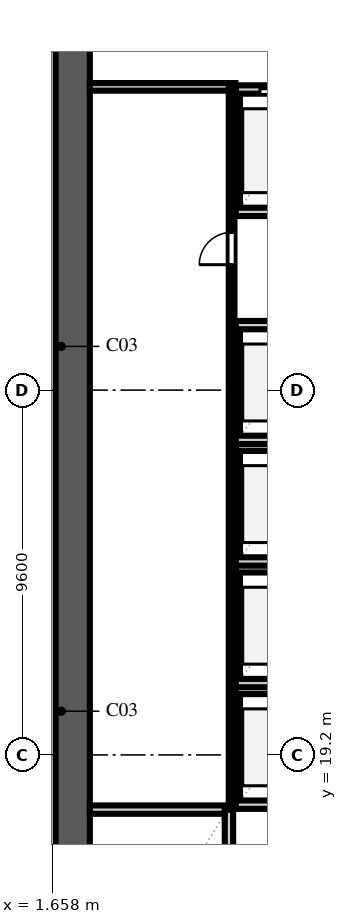
"""IFC4 building model, lengths in metres.
Left out: names, types, materials, properties, quantities, classifications, styles, units other than length and angle.
Written with IfcOpenShell. Run it as: python <this file> out.ifc"""

import sys

from ifc_helpers import new_model, si_unit, direction, frame, frame_2d, origin, place, context, subcontext, project, spatial, rectangle, extrude, element, fill, save


model = new_model("IFC4")
c1 = context("Model", 3, precision=1e-05, world=origin(), true_north=direction((0.0, 1.0)))
c2 = subcontext(c1, "Body", "Model", "MODEL_VIEW")
j1 = project(units=[si_unit("LENGTHUNIT", "METRE"), si_unit("PLANEANGLEUNIT", "RADIAN")], contexts=[c1])
p1 = place(None, origin())
s1 = spatial("IfcSite", under=j1, at=p1, CompositionType="ELEMENT")
p2 = place(p1, origin())
s2 = spatial("IfcBuilding", under=s1, at=p2, CompositionType="ELEMENT")
p3 = place(p2, frame((0.0, 0.0, 62.2)))
s3 = spatial("IfcBuildingStorey", under=s2, at=p3, CompositionType="ELEMENT", Elevation=62.2)
p4 = place(p3, frame((2.2, 9.15, 0.0), z_axis=(0.0, 0.0, 1.0), x_axis=(0.0, 1.0, 0.0)))
e1 = element("IfcWall", 1, at=p4, inside=s3, PredefinedType="SHEAR", context=c2, shape_type="SweptSolid", body=[
    extrude(rectangle(XDim=39.3, YDim=0.9, at=frame_2d((19.65, 0.0))), origin(), (0.0, 0.0, 1.0), 3.54),
])
p5 = place(p3, frame((6.31, 9.95, 0.0), z_axis=(0.0, 0.0, 1.0), x_axis=(0.0, 1.0, 0.0)))
e2 = element("IfcWall", 2, at=p5, inside=s3, PredefinedType="SOLIDWALL", context=c2, shape_type="SweptSolid", body=[
    extrude(rectangle(XDim=7.81, YDim=0.22, at=frame_2d((3.905, 0.0))), origin(), (0.0, 0.0, 1.0), 3.54),
])
p6 = place(p5, frame((0.14, 0.0, 0.0)))
e3 = element("IfcOpeningElement", 3, at=p6, cuts=e2, PredefinedType="OPENING", context=c2, shape_type="SweptSolid", body=[
    extrude(rectangle(XDim=1.1, YDim=2.2, at=frame_2d((0.55, 1.1))), frame((0.0, 0.122, 0.0), z_axis=(0.0, -1.0, 0.0), x_axis=(1.0, 0.0, 0.0)), (0.0, 0.0, 1.0), 0.244),
])
p7 = place(p3, frame((2.65, 17.76, 0.0), z_axis=(0.0, 0.0, 1.0), x_axis=(1.0, 0.0, 0.0)))
e4 = element("IfcWall", 4, at=p7, inside=s3, PredefinedType="SOLIDWALL", context=c2, shape_type="SweptSolid", body=[
    extrude(rectangle(XDim=3.55, YDim=0.22, at=frame_2d((1.775, 0.0))), origin(), (0.0, 0.0, 1.0), 3.54),
])
p8 = place(p3, frame((6.49, 18.11, 0.0), z_axis=(0.0, 0.0, 1.0), x_axis=(0.0, 1.0, 0.0)))
e5 = element("IfcWall", 5, at=p8, inside=s3, PredefinedType="SOLIDWALL", context=c2, shape_type="SweptSolid", body=[
    extrude(rectangle(XDim=2.58, YDim=0.22, at=frame_2d((1.29, 0.0))), origin(), (0.0, 0.0, 1.0), 3.54),
])
for number, where, z_axis, x_axis in (
    (6, (6.49, 17.89, 0.0), (0.0, 0.0, 1.0), (1.0, 0.0, 0.0)),
    (7, (6.49, 20.91, 0.0), (0.0, 0.0, 1.0), (1.0, 0.0, 0.0)),
):
    element("IfcWall", number, at=place(p3, frame(where, z_axis=z_axis, x_axis=x_axis)), inside=s3, PredefinedType="SOLIDWALL", context=c2, shape_type="SweptSolid", body=[
        extrude(rectangle(XDim=2.47, YDim=0.22, at=frame_2d((1.235, 0.0))), origin(), (0.0, 0.0, 1.0), 3.54),
    ])
p9 = place(p3, frame((6.49, 21.31, 0.0), z_axis=(0.0, 0.0, 1.0), x_axis=(0.0, 1.0, 0.0)))
e8 = element("IfcWall", 8, at=p9, inside=s3, PredefinedType="SOLIDWALL", context=c2, shape_type="SweptSolid", body=[
    extrude(rectangle(XDim=2.58, YDim=0.22, at=frame_2d((1.29, 0.0))), origin(), (0.0, 0.0, 1.0), 3.54),
])
for number, where, z_axis, x_axis in (
    (9, (6.49, 21.09, 0.0), (0.0, 0.0, 1.0), (1.0, 0.0, 0.0)),
    (10, (6.49, 24.11, 0.0), (0.0, 0.0, 1.0), (1.0, 0.0, 0.0)),
):
    element("IfcWall", number, at=place(p3, frame(where, z_axis=z_axis, x_axis=x_axis)), inside=s3, PredefinedType="SOLIDWALL", context=c2, shape_type="SweptSolid", body=[
        extrude(rectangle(XDim=2.47, YDim=0.22, at=frame_2d((1.235, 0.0))), origin(), (0.0, 0.0, 1.0), 3.54),
    ])
p10 = place(p3, frame((6.49, 24.51, 0.0), z_axis=(0.0, 0.0, 1.0), x_axis=(0.0, 1.0, 0.0)))
e11 = element("IfcWall", 11, at=p10, inside=s3, PredefinedType="SOLIDWALL", context=c2, shape_type="SweptSolid", body=[
    extrude(rectangle(XDim=2.58, YDim=0.22, at=frame_2d((1.29, 0.0))), origin(), (0.0, 0.0, 1.0), 3.54),
])
for number, where, z_axis, x_axis in (
    (12, (6.49, 24.29, 0.0), (0.0, 0.0, 1.0), (1.0, 0.0, 0.0)),
    (13, (6.49, 27.31, 0.0), (0.0, 0.0, 1.0), (1.0, 0.0, 0.0)),
):
    element("IfcWall", number, at=place(p3, frame(where, z_axis=z_axis, x_axis=x_axis)), inside=s3, PredefinedType="SOLIDWALL", context=c2, shape_type="SweptSolid", body=[
        extrude(rectangle(XDim=2.47, YDim=0.22, at=frame_2d((1.235, 0.0))), origin(), (0.0, 0.0, 1.0), 3.54),
    ])
p11 = place(p3, frame((6.49, 27.71, 0.0), z_axis=(0.0, 0.0, 1.0), x_axis=(0.0, 1.0, 0.0)))
e14 = element("IfcWall", 14, at=p11, inside=s3, PredefinedType="SOLIDWALL", context=c2, shape_type="SweptSolid", body=[
    extrude(rectangle(XDim=2.58, YDim=0.22, at=frame_2d((1.29, 0.0))), origin(), (0.0, 0.0, 1.0), 3.54),
])
for number, where, z_axis, x_axis in (
    (15, (6.49, 27.49, 0.0), (0.0, 0.0, 1.0), (1.0, 0.0, 0.0)),
    (16, (6.49, 30.51, 0.0), (0.0, 0.0, 1.0), (1.0, 0.0, 0.0)),
):
    element("IfcWall", number, at=place(p3, frame(where, z_axis=z_axis, x_axis=x_axis)), inside=s3, PredefinedType="SOLIDWALL", context=c2, shape_type="SweptSolid", body=[
        extrude(rectangle(XDim=2.47, YDim=0.22, at=frame_2d((1.235, 0.0))), origin(), (0.0, 0.0, 1.0), 3.54),
    ])
p12 = place(p3, frame((6.49, 33.71, 0.0), z_axis=(0.0, 0.0, 1.0), x_axis=(0.0, 1.0, 0.0)))
e17 = element("IfcWall", 17, at=p12, inside=s3, PredefinedType="SOLIDWALL", context=c2, shape_type="SweptSolid", body=[
    extrude(rectangle(XDim=2.78, YDim=0.22, at=frame_2d((1.39, 0.0))), origin(), (0.0, 0.0, 1.0), 3.54),
])
p13 = place(p3, frame((6.49, 33.49, 0.0), z_axis=(0.0, 0.0, 1.0), x_axis=(1.0, 0.0, 0.0)))
e18 = element("IfcWall", 18, at=p13, inside=s3, PredefinedType="SOLIDWALL", context=c2, shape_type="SweptSolid", body=[
    extrude(rectangle(XDim=2.47, YDim=0.22, at=frame_2d((1.235, 0.0))), origin(), (0.0, 0.0, 1.0), 3.54),
])
p14 = place(p3, frame((6.49, 36.71, 0.0), z_axis=(0.0, 0.0, 1.0), x_axis=(1.0, 0.0, 0.0)))
e19 = element("IfcWall", 19, at=p14, inside=s3, PredefinedType="SOLIDWALL", context=c2, shape_type="SweptSolid", body=[
    extrude(rectangle(XDim=2.47, YDim=0.22, at=frame_2d((1.235, 0.0))), origin(), (0.0, 0.0, 1.0), 3.54),
])
p15 = place(p14, frame((0.635, 0.0, 0.0)))
e20 = element("IfcOpeningElement", 20, at=p15, cuts=e19, PredefinedType="OPENING", context=c2, shape_type="SweptSolid", body=[
    extrude(rectangle(XDim=1.2, YDim=2.2, at=frame_2d((0.6, 1.1))), frame((0.0, 0.122, 0.0), z_axis=(0.0, -1.0, 0.0), x_axis=(1.0, 0.0, 0.0)), (0.0, 0.0, 1.0), 0.244),
])
p16 = place(p3, frame((2.65, 36.78, 0.0), z_axis=(0.0, 0.0, 1.0), x_axis=(1.0, 0.0, 0.0)))
e21 = element("IfcWall", 21, at=p16, inside=s3, PredefinedType="SOLIDWALL", context=c2, shape_type="SweptSolid", body=[
    extrude(rectangle(XDim=3.83, YDim=0.2, at=frame_2d((1.915, 0.0))), origin(), (0.0, 0.0, 1.0), 3.54),
])
p17 = place(p3, frame((6.38, 17.8, 0.0), z_axis=(0.0, 0.0, 1.0), x_axis=(0.0, 1.0, 0.0)))
e22 = element("IfcWall", 22, at=p17, inside=s3, PredefinedType="PARTITIONING", context=c2, shape_type="SweptSolid", body=[
    extrude(rectangle(XDim=18.98, YDim=0.15, at=frame_2d((9.49, 0.0))), origin(), (0.0, 0.0, 1.0), 3.54),
])
p18 = place(p17, frame((14.3, 0.0, 0.0)))
e23 = element("IfcOpeningElement", 23, at=p18, cuts=e22, PredefinedType="OPENING", context=c2, shape_type="SweptSolid", body=[
    extrude(rectangle(XDim=0.85, YDim=2.1, at=frame_2d((0.425, 1.05))), frame((0.0, 0.087, 0.0), z_axis=(0.0, -1.0, 0.0), x_axis=(1.0, 0.0, 0.0)), (0.0, 0.0, 1.0), 0.174),
])
p19 = place(p15, origin())
e24 = element("IfcDoor", 24, at=p19, inside=s3, OperationType="DOUBLE_DOOR_SLIDING", PredefinedType="DOOR", context=c2, shape_type="SweptSolid", body=[
    extrude(rectangle(XDim=1.2, YDim=2.2, at=frame_2d((0.6, 1.1))), frame((0.0, 0.025, 0.0), z_axis=(0.0, -1.0, 0.0), x_axis=(1.0, 0.0, 0.0)), (0.0, 0.0, 1.0), 0.05),
])
fill(e20, e24)
p20 = place(p18, origin())
e25 = element("IfcDoor", 25, at=p20, inside=s3, OperationType="SINGLE_SWING_LEFT", PredefinedType="DOOR", context=c2, shape_type="SweptSolid", body=[
    extrude(rectangle(XDim=0.85, YDim=2.1, at=frame_2d((0.425, 1.05))), frame((0.0, 0.025, 0.0), z_axis=(0.0, -1.0, 0.0), x_axis=(1.0, 0.0, 0.0)), (0.0, 0.0, 1.0), 0.05),
])
fill(e23, e25)
save(model, sys.argv[1])
